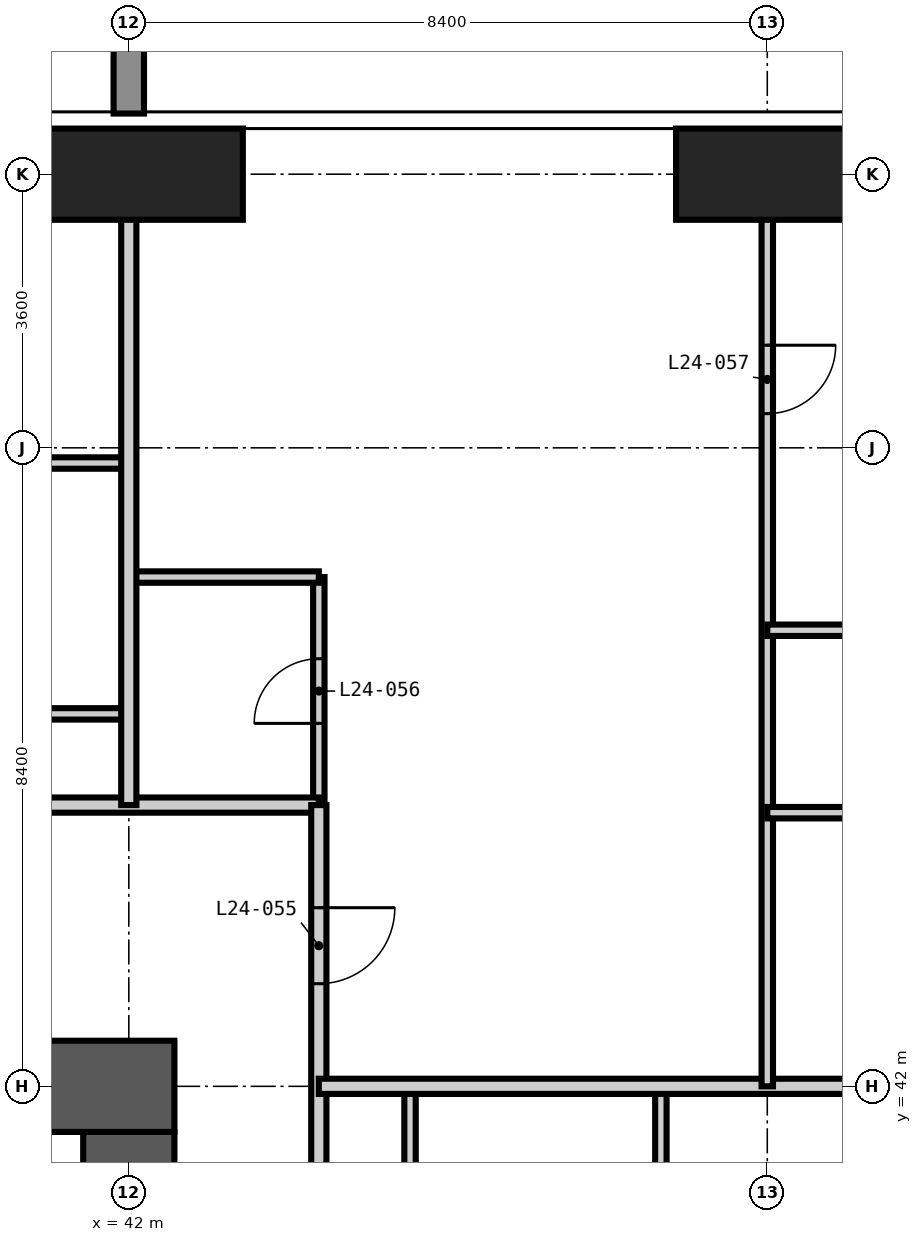
"""IFC4 building model, lengths in metres.
Left out: names, types, materials, properties, quantities, classifications, styles, units other than length and angle.
Written with IfcOpenShell. Run it as: python <this file> out.ifc"""

import sys

from ifc_helpers import new_model, si_unit, direction, frame, frame_2d, origin, origin_2d, place, context, subcontext, project, spatial, rectangle, extrude, element, fill, save


model = new_model("IFC4")
c1 = context("Model", 3, precision=1e-05, world=origin(), true_north=direction((0.0, 1.0)))
c2 = subcontext(c1, "Body", "Model", "MODEL_VIEW")
j1 = project(units=[si_unit("LENGTHUNIT", "METRE"), si_unit("PLANEANGLEUNIT", "RADIAN")], contexts=[c1])
p1 = place(None, origin())
s1 = spatial("IfcSite", under=j1, at=p1, CompositionType="ELEMENT")
p2 = place(p1, origin())
s2 = spatial("IfcBuilding", under=s1, at=p2, CompositionType="ELEMENT")
p3 = place(p2, frame((0.0, 0.0, 97.2)))
s3 = spatial("IfcBuildingStorey", under=s2, at=p3, CompositionType="ELEMENT", Elevation=97.2)
p4 = place(p3, frame((42.0, 54.0, -0.35), z_axis=(0.0, 0.0, 1.0), x_axis=(1.0, 0.0, 0.0)))
e1 = element("IfcColumn", 1, at=p4, inside=s3, PredefinedType="COLUMN", context=c2, shape_type="SweptSolid", body=[
    extrude(rectangle(XDim=3.0, YDim=1.2, at=origin_2d()), origin(), (0.0, 0.0, 1.0), 3.6),
])
p5 = place(p3, frame((50.4, 54.0, -0.35), z_axis=(0.0, 0.0, 1.0), x_axis=(1.0, 0.0, 0.0)))
e2 = element("IfcColumn", 2, at=p5, inside=s3, PredefinedType="COLUMN", context=c2, shape_type="SweptSolid", body=[
    extrude(rectangle(XDim=2.4, YDim=1.2, at=origin_2d()), origin(), (0.0, 0.0, 1.0), 3.6),
])
p6 = place(p3, frame((42.0, 17.4, -0.35), z_axis=(0.0, 0.0, 1.0), x_axis=(0.0, 1.0, 0.0)))
e3 = element("IfcWall", 3, at=p6, inside=s3, PredefinedType="SHEAR", context=c2, shape_type="SweptSolid", body=[
    extrude(rectangle(XDim=24.0, YDim=1.2, at=frame_2d((12.0, 0.0))), origin(), (0.0, 0.0, 1.0), 3.6),
])
p7 = place(p6, frame((0.2, 0.0, 0.35)))
e4 = element("IfcOpeningElement", 4, at=p7, cuts=e3, PredefinedType="OPENING", context=c2, shape_type="SweptSolid", body=[
    extrude(rectangle(XDim=1.2, YDim=2.2, at=frame_2d((0.6, 1.1))), frame((0.0, 0.61, 0.0), z_axis=(0.0, -1.0, 0.0), x_axis=(1.0, 0.0, 0.0)), (0.0, 0.0, 1.0), 1.22),
])
p8 = place(p6, frame((11.1, 0.0, 0.35)))
e5 = element("IfcOpeningElement", 5, at=p8, cuts=e3, PredefinedType="OPENING", context=c2, shape_type="SweptSolid", body=[
    extrude(rectangle(XDim=1.8, YDim=2.2, at=frame_2d((0.9, 1.1))), frame((0.0, 0.61, 0.0), z_axis=(0.0, -1.0, 0.0), x_axis=(1.0, 0.0, 0.0)), (0.0, 0.0, 1.0), 1.22),
])
p9 = place(p6, frame((19.9, 0.0, 0.35)))
e6 = element("IfcOpeningElement", 6, at=p9, cuts=e3, PredefinedType="OPENING", context=c2, shape_type="SweptSolid", body=[
    extrude(rectangle(XDim=1.0, YDim=2.1, at=frame_2d((0.5, 1.05))), frame((0.0, 0.61, 0.0), z_axis=(0.0, -1.0, 0.0), x_axis=(1.0, 0.0, 0.0)), (0.0, 0.0, 1.0), 1.22),
])
p10 = place(p3, frame((42.6, 42.0, -0.35), z_axis=(0.0, 0.0, 1.0), x_axis=(-1.0, 0.0, 0.0)))
e7 = element("IfcWall", 7, at=p10, inside=s3, PredefinedType="SHEAR", context=c2, shape_type="SweptSolid", body=[
    extrude(rectangle(XDim=26.4, YDim=1.2, at=frame_2d((13.2, 0.0))), origin(), (0.0, 0.0, 1.0), 3.6),
])
p11 = place(p10, frame((21.1, 0.0, 0.35)))
e8 = element("IfcOpeningElement", 8, at=p11, cuts=e7, PredefinedType="OPENING", context=c2, shape_type="SweptSolid", body=[
    extrude(rectangle(XDim=1.0, YDim=2.1, at=frame_2d((0.5, 1.05))), frame((0.0, 0.61, 0.0), z_axis=(0.0, -1.0, 0.0), x_axis=(1.0, 0.0, 0.0)), (0.0, 0.0, 1.0), 1.22),
])
p12 = place(p10, frame((10.5, 0.0, 0.35)))
e9 = element("IfcOpeningElement", 9, at=p12, cuts=e7, PredefinedType="OPENING", context=c2, shape_type="SweptSolid", body=[
    extrude(rectangle(XDim=1.2, YDim=2.2, at=frame_2d((0.6, 1.1))), frame((0.0, 0.61, 0.0), z_axis=(0.0, -1.0, 0.0), x_axis=(1.0, 0.0, 0.0)), (0.0, 0.0, 1.0), 1.22),
])
p13 = place(p3, frame((44.5, 45.7, 0.0), z_axis=(0.0, 0.0, 1.0), x_axis=(0.0, 1.0, 0.0)))
e10 = element("IfcWall", 10, at=p13, inside=s3, PredefinedType="PARTITIONING", context=c2, shape_type="SweptSolid", body=[
    extrude(rectangle(XDim=3.0, YDim=0.15, at=frame_2d((1.5, 0.0))), origin(), (0.0, 0.0, 1.0), 3.25),
])
p14 = place(p13, frame((1.075, 0.0, 0.0)))
e11 = element("IfcOpeningElement", 11, at=p14, cuts=e10, PredefinedType="OPENING", context=c2, shape_type="SweptSolid", body=[
    extrude(rectangle(XDim=0.85, YDim=2.1, at=frame_2d((0.425, 1.05))), frame((0.0, 0.085, 0.0), z_axis=(0.0, -1.0, 0.0), x_axis=(1.0, 0.0, 0.0)), (0.0, 0.0, 1.0), 0.17),
])
for number, where, z_axis, x_axis in (
    (12, (45.7, 39.6, 0.0), (0.0, 0.0, 1.0), (0.0, 1.0, 0.0)),
    (13, (49.0, 39.6, 0.0), (0.0, 0.0, 1.0), (0.0, 1.0, 0.0)),
    (14, (39.6, 46.9, 0.0), (0.0, 0.0, 1.0), (1.0, 0.0, 0.0)),
):
    element("IfcWall", number, at=place(p3, frame(where, z_axis=z_axis, x_axis=x_axis)), inside=s3, PredefinedType="PARTITIONING", context=c2, shape_type="SweptSolid", body=[
        extrude(rectangle(XDim=2.4, YDim=0.15, at=frame_2d((1.2, 0.0))), origin(), (0.0, 0.0, 1.0), 3.25),
    ])
p15 = place(p3, frame((42.0, 48.7, 0.0), z_axis=(0.0, 0.0, 1.0), x_axis=(1.0, 0.0, 0.0)))
e15 = element("IfcWall", 15, at=p15, inside=s3, PredefinedType="PARTITIONING", context=c2, shape_type="SweptSolid", body=[
    extrude(rectangle(XDim=2.5, YDim=0.15, at=frame_2d((1.25, 0.0))), origin(), (0.0, 0.0, 1.0), 3.25),
])
p16 = place(p3, frame((39.6, 50.2, 0.0), z_axis=(0.0, 0.0, 1.0), x_axis=(1.0, 0.0, 0.0)))
e16 = element("IfcWall", 16, at=p16, inside=s3, PredefinedType="PARTITIONING", context=c2, shape_type="SweptSolid", body=[
    extrude(rectangle(XDim=2.4, YDim=0.15, at=frame_2d((1.2, 0.0))), origin(), (0.0, 0.0, 1.0), 3.25),
])
p17 = place(p3, frame((12.6, 45.7, 0.0), z_axis=(0.0, 0.0, 1.0), x_axis=(1.0, 0.0, 0.0)))
e17 = element("IfcWall", 17, at=p17, inside=s3, PredefinedType="PARTITIONING", context=c2, shape_type="SweptSolid", body=[
    extrude(rectangle(XDim=31.9, YDim=0.2, at=frame_2d((15.95, 0.0))), origin(), (0.0, 0.0, 1.0), 3.25),
])
p18 = place(p17, frame((5.8, 0.0, 0.0)))
e18 = element("IfcOpeningElement", 18, at=p18, cuts=e17, PredefinedType="OPENING", context=c2, shape_type="SweptSolid", body=[
    extrude(rectangle(XDim=1.0, YDim=2.2, at=frame_2d((0.5, 1.1))), frame((0.0, 0.11, 0.0), z_axis=(0.0, -1.0, 0.0), x_axis=(1.0, 0.0, 0.0)), (0.0, 0.0, 1.0), 0.22),
])
p19 = place(p17, frame((12.1, 0.0, 0.0)))
e19 = element("IfcOpeningElement", 19, at=p19, cuts=e17, PredefinedType="OPENING", context=c2, shape_type="SweptSolid", body=[
    extrude(rectangle(XDim=1.0, YDim=2.2, at=frame_2d((0.5, 1.1))), frame((0.0, 0.11, 0.0), z_axis=(0.0, -1.0, 0.0), x_axis=(1.0, 0.0, 0.0)), (0.0, 0.0, 1.0), 0.22),
])
p20 = place(p17, frame((20.5, 0.0, 0.0)))
e20 = element("IfcOpeningElement", 20, at=p20, cuts=e17, PredefinedType="OPENING", context=c2, shape_type="SweptSolid", body=[
    extrude(rectangle(XDim=1.0, YDim=2.2, at=frame_2d((0.5, 1.1))), frame((0.0, 0.11, 0.0), z_axis=(0.0, -1.0, 0.0), x_axis=(1.0, 0.0, 0.0)), (0.0, 0.0, 1.0), 0.22),
])
p21 = place(p17, frame((26.8, 0.0, 0.0)))
e21 = element("IfcOpeningElement", 21, at=p21, cuts=e17, PredefinedType="OPENING", context=c2, shape_type="SweptSolid", body=[
    extrude(rectangle(XDim=1.0, YDim=2.2, at=frame_2d((0.5, 1.1))), frame((0.0, 0.11, 0.0), z_axis=(0.0, -1.0, 0.0), x_axis=(1.0, 0.0, 0.0)), (0.0, 0.0, 1.0), 0.22),
])
p22 = place(p3, frame((44.5, 45.7, 0.0), z_axis=(0.0, 0.0, 1.0), x_axis=(0.0, -1.0, 0.0)))
e22 = element("IfcWall", 22, at=p22, inside=s3, PredefinedType="PARTITIONING", context=c2, shape_type="SweptSolid", body=[
    extrude(rectangle(XDim=32.0, YDim=0.2, at=frame_2d((16.0, 0.0))), origin(), (0.0, 0.0, 1.0), 3.25),
])
p23 = place(p22, frame((26.3, 0.0, 0.0)))
e23 = element("IfcOpeningElement", 23, at=p23, cuts=e22, PredefinedType="OPENING", context=c2, shape_type="SweptSolid", body=[
    extrude(rectangle(XDim=1.0, YDim=2.2, at=frame_2d((0.5, 1.1))), frame((0.0, 0.11, 0.0), z_axis=(0.0, -1.0, 0.0), x_axis=(1.0, 0.0, 0.0)), (0.0, 0.0, 1.0), 0.22),
])
p24 = place(p22, frame((20.0, 0.0, 0.0)))
e24 = element("IfcOpeningElement", 24, at=p24, cuts=e22, PredefinedType="OPENING", context=c2, shape_type="SweptSolid", body=[
    extrude(rectangle(XDim=1.0, YDim=2.2, at=frame_2d((0.5, 1.1))), frame((0.0, 0.11, 0.0), z_axis=(0.0, -1.0, 0.0), x_axis=(1.0, 0.0, 0.0)), (0.0, 0.0, 1.0), 0.22),
])
p25 = place(p22, frame((11.6, 0.0, 0.0)))
e25 = element("IfcOpeningElement", 25, at=p25, cuts=e22, PredefinedType="OPENING", context=c2, shape_type="SweptSolid", body=[
    extrude(rectangle(XDim=1.0, YDim=2.2, at=frame_2d((0.5, 1.1))), frame((0.0, 0.11, 0.0), z_axis=(0.0, -1.0, 0.0), x_axis=(1.0, 0.0, 0.0)), (0.0, 0.0, 1.0), 0.22),
])
p26 = place(p22, frame((5.3, 0.0, 0.0)))
e26 = element("IfcOpeningElement", 26, at=p26, cuts=e22, PredefinedType="OPENING", context=c2, shape_type="SweptSolid", body=[
    extrude(rectangle(XDim=1.0, YDim=2.2, at=frame_2d((0.5, 1.1))), frame((0.0, 0.11, 0.0), z_axis=(0.0, -1.0, 0.0), x_axis=(1.0, 0.0, 0.0)), (0.0, 0.0, 1.0), 0.22),
])
p27 = place(p22, frame((29.95, 0.0, 0.0)))
e27 = element("IfcOpeningElement", 27, at=p27, cuts=e22, PredefinedType="OPENING", context=c2, shape_type="SweptSolid", body=[
    extrude(rectangle(XDim=1.0, YDim=2.2, at=frame_2d((0.5, 1.1))), frame((0.0, 0.11, 0.0), z_axis=(0.0, -1.0, 0.0), x_axis=(1.0, 0.0, 0.0)), (0.0, 0.0, 1.0), 0.22),
])
p28 = place(p22, frame((1.35, 0.0, 0.0)))
e28 = element("IfcOpeningElement", 28, at=p28, cuts=e22, PredefinedType="OPENING", context=c2, shape_type="SweptSolid", body=[
    extrude(rectangle(XDim=1.0, YDim=2.2, at=frame_2d((0.5, 1.1))), frame((0.0, 0.11, 0.0), z_axis=(0.0, -1.0, 0.0), x_axis=(1.0, 0.0, 0.0)), (0.0, 0.0, 1.0), 0.22),
])
p29 = place(p3, frame((42.0, 45.7, 0.0), z_axis=(0.0, 0.0, 1.0), x_axis=(0.0, 1.0, 0.0)))
e29 = element("IfcWall", 29, at=p29, inside=s3, PredefinedType="PARTITIONING", context=c2, shape_type="SweptSolid", body=[
    extrude(rectangle(XDim=8.918, YDim=0.2, at=frame_2d((4.459, 0.0))), origin(), (0.0, 0.0, 1.0), 3.25),
])
p30 = place(p3, frame((44.5, 42.0, 0.0), z_axis=(0.0, 0.0, 1.0), x_axis=(1.0, 0.0, 0.0)))
e30 = element("IfcWall", 30, at=p30, inside=s3, PredefinedType="PARTITIONING", context=c2, shape_type="SweptSolid", body=[
    extrude(rectangle(XDim=10.118, YDim=0.2, at=frame_2d((5.059, 0.0))), origin(), (0.0, 0.0, 1.0), 3.25),
])
p31 = place(p3, frame((50.4, 42.0, 0.0), z_axis=(0.0, 0.0, 1.0), x_axis=(0.0, 1.0, 0.0)))
e31 = element("IfcWall", 31, at=p31, inside=s3, PredefinedType="PARTITIONING", context=c2, shape_type="SweptSolid", body=[
    extrude(rectangle(XDim=12.618, YDim=0.15, at=frame_2d((6.309, 0.0))), origin(), (0.0, 0.0, 1.0), 3.25),
])
p32 = place(p31, frame((8.85, 0.0, 0.0)))
e32 = element("IfcOpeningElement", 32, at=p32, cuts=e31, PredefinedType="OPENING", context=c2, shape_type="SweptSolid", body=[
    extrude(rectangle(XDim=0.9, YDim=2.1, at=frame_2d((0.45, 1.05))), frame((0.0, 0.085, 0.0), z_axis=(0.0, -1.0, 0.0), x_axis=(1.0, 0.0, 0.0)), (0.0, 0.0, 1.0), 0.17),
])
p33 = place(p3, frame((50.4, 45.6, 0.0), z_axis=(0.0, 0.0, 1.0), x_axis=(1.0, 0.0, 0.0)))
e33 = element("IfcWall", 33, at=p33, inside=s3, PredefinedType="PARTITIONING", context=c2, shape_type="SweptSolid", body=[
    extrude(rectangle(XDim=3.0, YDim=0.15, at=frame_2d((1.5, 0.0))), origin(), (0.0, 0.0, 1.0), 3.25),
])
p34 = place(p3, frame((50.4, 48.0, 0.0), z_axis=(0.0, 0.0, 1.0), x_axis=(1.0, 0.0, 0.0)))
e34 = element("IfcWall", 34, at=p34, inside=s3, PredefinedType="PARTITIONING", context=c2, shape_type="SweptSolid", body=[
    extrude(rectangle(XDim=3.0, YDim=0.15, at=frame_2d((1.5, 0.0))), origin(), (0.0, 0.0, 1.0), 3.25),
])
p35 = place(p34, frame((1.05, 0.0, 0.0)))
e35 = element("IfcOpeningElement", 35, at=p35, cuts=e34, PredefinedType="OPENING", context=c2, shape_type="SweptSolid", body=[
    extrude(rectangle(XDim=0.9, YDim=2.1, at=frame_2d((0.45, 1.05))), frame((0.0, 0.085, 0.0), z_axis=(0.0, -1.0, 0.0), x_axis=(1.0, 0.0, 0.0)), (0.0, 0.0, 1.0), 0.17),
])
p36 = place(p28, origin())
e36 = element("IfcDoor", 36, at=p36, inside=s3, OperationType="SINGLE_SWING_LEFT", PredefinedType="DOOR", context=c2, shape_type="SweptSolid", body=[
    extrude(rectangle(XDim=1.0, YDim=2.2, at=frame_2d((0.5, 1.1))), frame((0.0, 0.025, 0.0), z_axis=(0.0, -1.0, 0.0), x_axis=(1.0, 0.0, 0.0)), (0.0, 0.0, 1.0), 0.05),
])
fill(e28, e36)
p37 = place(p14, origin())
e37 = element("IfcDoor", 37, at=p37, inside=s3, OperationType="SINGLE_SWING_LEFT", PredefinedType="DOOR", context=c2, shape_type="SweptSolid", body=[
    extrude(rectangle(XDim=0.85, YDim=2.1, at=frame_2d((0.425, 1.05))), frame((0.0, 0.025, 0.0), z_axis=(0.0, -1.0, 0.0), x_axis=(1.0, 0.0, 0.0)), (0.0, 0.0, 1.0), 0.05),
])
fill(e11, e37)
p38 = place(p32, frame((0.9, 0.0, 0.0), z_axis=(0.0, 0.0, 1.0), x_axis=(-1.0, 0.0, 0.0)))
e38 = element("IfcDoor", 38, at=p38, inside=s3, OperationType="SINGLE_SWING_LEFT", PredefinedType="DOOR", context=c2, shape_type="SweptSolid", body=[
    extrude(rectangle(XDim=0.9, YDim=2.1, at=frame_2d((0.45, 1.05))), frame((0.0, 0.025, 0.0), z_axis=(0.0, -1.0, 0.0), x_axis=(1.0, 0.0, 0.0)), (0.0, 0.0, 1.0), 0.05),
])
fill(e32, e38)
save(model, sys.argv[1])
